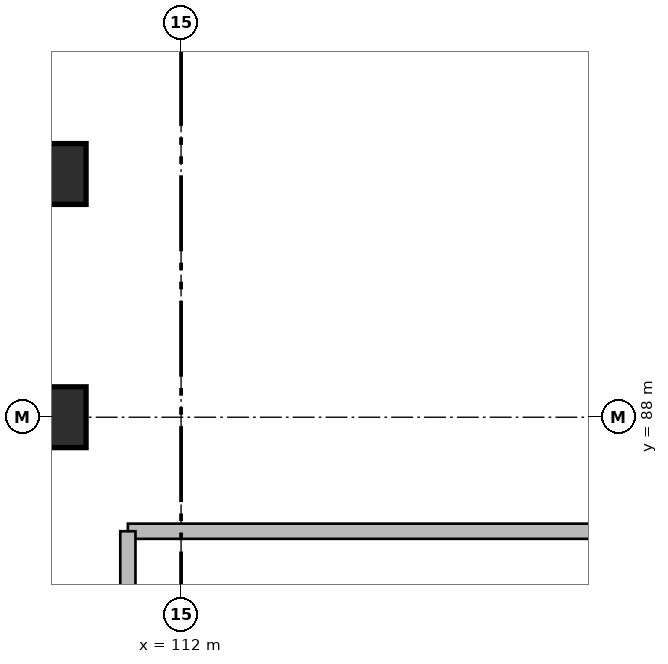
"""IFC4 building model, lengths in metres.
Left out: names, types, materials, properties, quantities, classifications, styles, units other than length and angle.
Written with IfcOpenShell. Run it as: python <this file> out.ifc"""

import sys

from ifc_helpers import new_model, si_unit, direction, frame, frame_2d, origin, origin_2d, place, context, subcontext, project, spatial, rectangle, extrude, element, save


model = new_model("IFC4")
c1 = context("Model", 3, precision=1e-05, world=origin(), true_north=direction((0.0, 1.0)))
c2 = subcontext(c1, "Body", "Model", "MODEL_VIEW")
j1 = project(units=[si_unit("LENGTHUNIT", "METRE"), si_unit("PLANEANGLEUNIT", "RADIAN")], contexts=[c1])
p1 = place(None, origin())
s1 = spatial("IfcSite", under=j1, at=p1, CompositionType="ELEMENT")
p2 = place(p1, origin())
s2 = spatial("IfcBuilding", under=s1, at=p2, CompositionType="ELEMENT")
p3 = place(p2, frame((0.0, 0.0, -3.84)))
s3 = spatial("IfcBuildingStorey", under=s2, at=p3, CompositionType="ELEMENT", Elevation=-3.84)
for number, where, z_axis, x_axis in (
    (1, (110.35, 88.0, 0.0), (0.0, 0.0, 1.0), (1.0, 0.0, 0.0)),
    (2, (110.35, 91.2, 0.0), (0.0, 0.0, 1.0), (1.0, 0.0, 0.0)),
):
    element("IfcColumn", number, at=place(p3, frame(where, z_axis=z_axis, x_axis=x_axis)), inside=s3, PredefinedType="COLUMN", context=c2, shape_type="SweptSolid", body=[
        extrude(rectangle(XDim=0.8, YDim=0.8, at=origin_2d()), origin(), (0.0, 0.0, 1.0), 3.84),
    ])
p4 = place(p3, frame((127.5, 86.5, 0.0), z_axis=(0.0, 0.0, 1.0), x_axis=(-1.0, 0.0, 0.0)))
e3 = element("IfcWall", 3, at=p4, inside=s3, PredefinedType="SOLIDWALL", context=c2, shape_type="SweptSolid", body=[
    extrude(rectangle(XDim=16.2, YDim=0.2, at=frame_2d((8.1, 0.0))), origin(), (0.0, 0.0, 1.0), 3.52),
])
p5 = place(p4, frame((8.8, 0.0, 0.0)))
e4 = element("IfcOpeningElement", 4, at=p5, cuts=e3, PredefinedType="OPENING", context=c2, shape_type="SweptSolid", body=[
    extrude(rectangle(XDim=1.0, YDim=2.1, at=frame_2d((0.5, 1.05))), frame((0.0, 0.11, 0.0), z_axis=(0.0, -1.0, 0.0), x_axis=(1.0, 0.0, 0.0)), (0.0, 0.0, 1.0), 0.22),
])
p6 = place(p3, frame((111.3, 86.5, 0.0), z_axis=(0.0, 0.0, 1.0), x_axis=(0.0, -1.0, 0.0)))
e5 = element("IfcWall", 5, at=p6, inside=s3, PredefinedType="SOLIDWALL", context=c2, shape_type="SweptSolid", body=[
    extrude(rectangle(XDim=9.3, YDim=0.2, at=frame_2d((4.65, 0.0))), origin(), (0.0, 0.0, 1.0), 3.52),
])
save(model, sys.argv[1])
